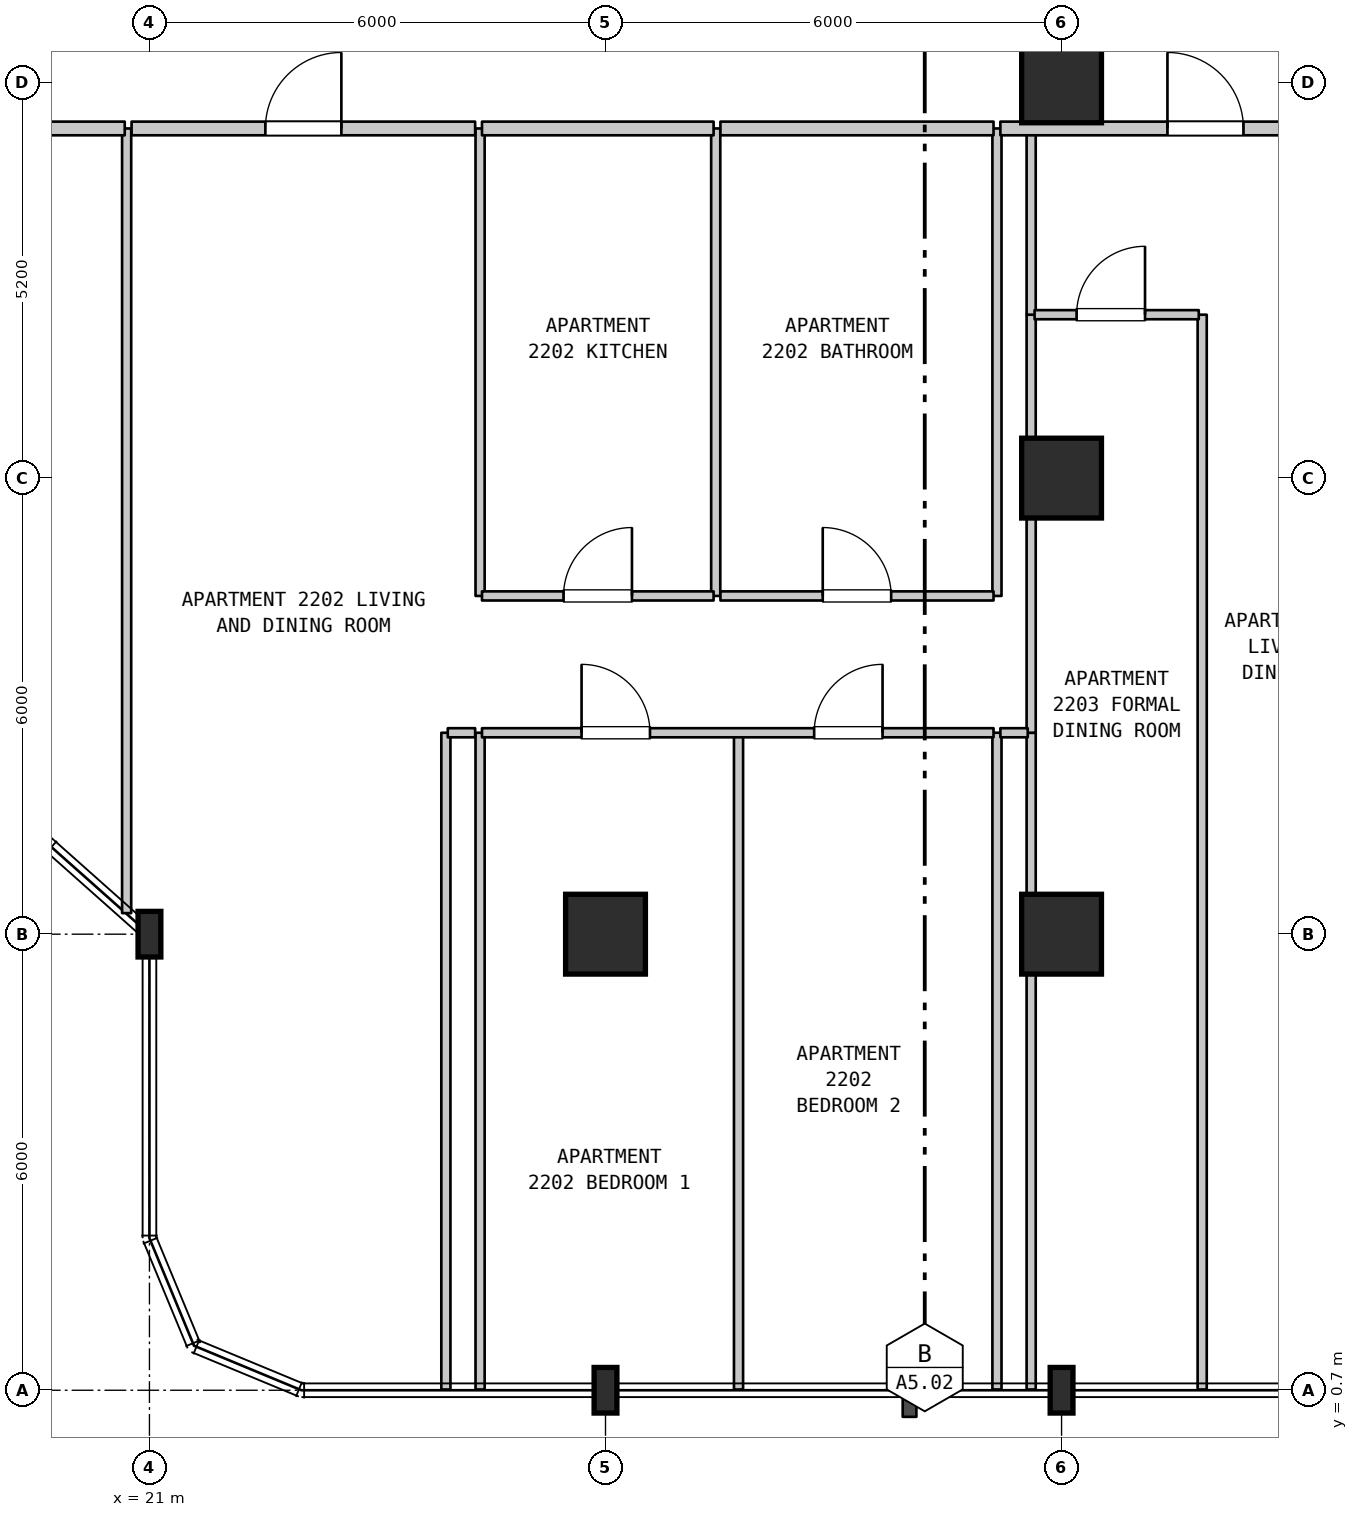
"""IFC4 building model, lengths in metres.
Left out: names, types, materials, properties, quantities, classifications, styles, units other than length and angle.
Written with IfcOpenShell. Run it as: python <this file> out.ifc"""

import sys

from ifc_helpers import new_model, si_unit, direction, frame, frame_2d, origin, origin_2d, place, context, subcontext, project, spatial, rectangle, i_section, extrude, element, fill, save


model = new_model("IFC4")
c1 = context("Model", 3, precision=1e-05, world=origin(), true_north=direction((0.0, 1.0)))
c2 = subcontext(c1, "Body", "Model", "MODEL_VIEW")
j1 = project(units=[si_unit("LENGTHUNIT", "METRE"), si_unit("PLANEANGLEUNIT", "RADIAN")], contexts=[c1])
p1 = place(None, origin())
s1 = spatial("IfcSite", under=j1, at=p1, CompositionType="ELEMENT")
p2 = place(p1, origin())
s2 = spatial("IfcBuilding", under=s1, at=p2, CompositionType="ELEMENT")
p3 = place(p2, frame((0.0, 0.0, 94.6)))
s3 = spatial("IfcBuildingStorey", under=s2, at=p3, CompositionType="ELEMENT", Elevation=94.6)
for number, where, z_axis, x_axis in (
    (1, (21.0, 6.7, 0.0), (0.0, 0.0, 1.0), (1.0, 0.0, 0.0)),
    (2, (27.0, 0.7, 0.0), (0.0, 0.0, 1.0), (1.0, 0.0, 0.0)),
):
    element("IfcColumn", number, at=place(p3, frame(where, z_axis=z_axis, x_axis=x_axis)), inside=s3, PredefinedType="COLUMN", context=c2, shape_type="SweptSolid", body=[
        extrude(i_section(OverallWidth=0.3, OverallDepth=0.6, WebThickness=0.015, FlangeThickness=0.03, FilletRadius=0.027, at=origin_2d()), origin(), (0.0, 0.0, 1.0), 3.7),
    ])
p4 = place(p3, frame((27.0, 6.7, 0.0), z_axis=(0.0, 0.0, 1.0), x_axis=(1.0, 0.0, 0.0)))
e3 = element("IfcColumn", 3, at=p4, inside=s3, PredefinedType="COLUMN", context=c2, shape_type="SweptSolid", body=[
    extrude(rectangle(XDim=1.05, YDim=1.05, at=origin_2d()), origin(), (0.0, 0.0, 1.0), 3.7),
])
p5 = place(p3, frame((33.0, 0.7, 0.0), z_axis=(0.0, 0.0, 1.0), x_axis=(1.0, 0.0, 0.0)))
e4 = element("IfcColumn", 4, at=p5, inside=s3, PredefinedType="COLUMN", context=c2, shape_type="SweptSolid", body=[
    extrude(i_section(OverallWidth=0.3, OverallDepth=0.6, WebThickness=0.015, FlangeThickness=0.03, FilletRadius=0.027, at=origin_2d()), origin(), (0.0, 0.0, 1.0), 3.7),
])
for number, where, z_axis, x_axis in (
    (5, (33.0, 6.7, 0.0), (0.0, 0.0, 1.0), (1.0, 0.0, 0.0)),
    (6, (33.0, 12.7, 0.0), (0.0, 0.0, 1.0), (1.0, 0.0, 0.0)),
    (7, (33.0, 17.9, 0.0), (0.0, 0.0, 1.0), (1.0, 0.0, 0.0)),
):
    element("IfcColumn", number, at=place(p3, frame(where, z_axis=z_axis, x_axis=x_axis)), inside=s3, PredefinedType="COLUMN", context=c2, shape_type="SweptSolid", body=[
        extrude(rectangle(XDim=1.05, YDim=1.05, at=origin_2d()), origin(), (0.0, 0.0, 1.0), 3.7),
    ])
p6 = place(p3, frame((20.7, 6.977, 0.0), z_axis=(0.0, 0.0, 1.0), x_axis=(0.0, 1.0, 0.0)))
e8 = element("IfcWall", 8, at=p6, inside=s3, PredefinedType="PARTITIONING", context=c2, shape_type="SweptSolid", body=[
    extrude(rectangle(XDim=10.323, YDim=0.12, at=frame_2d((5.162, 0.0))), origin(), (0.0, 0.0, 1.0), 3.385),
])
for number, where, z_axis, x_axis in (
    (9, (24.9, 0.71, 0.0), (0.0, 0.0, 1.0), (0.0, 1.0, 0.0)),
    (10, (25.35, 0.71, 0.0), (0.0, 0.0, 1.0), (0.0, 1.0, 0.0)),
):
    element("IfcWall", number, at=place(p3, frame(where, z_axis=z_axis, x_axis=x_axis)), inside=s3, PredefinedType="PARTITIONING", context=c2, shape_type="SweptSolid", body=[
        extrude(rectangle(XDim=8.64, YDim=0.12, at=frame_2d((4.32, 0.0))), origin(), (0.0, 0.0, 1.0), 3.385),
    ])
for number, where, z_axis, x_axis in (
    (11, (25.35, 11.15, 0.0), (0.0, 0.0, 1.0), (0.0, 1.0, 0.0)),
    (12, (28.45, 11.15, 0.0), (0.0, 0.0, 1.0), (0.0, 1.0, 0.0)),
):
    element("IfcWall", number, at=place(p3, frame(where, z_axis=z_axis, x_axis=x_axis)), inside=s3, PredefinedType="PARTITIONING", context=c2, shape_type="SweptSolid", body=[
        extrude(rectangle(XDim=6.15, YDim=0.12, at=frame_2d((3.075, 0.0))), origin(), (0.0, 0.0, 1.0), 3.385),
    ])
for number, where, z_axis, x_axis in (
    (13, (28.75, 0.71, 0.0), (0.0, 0.0, 1.0), (0.0, 1.0, 0.0)),
    (14, (32.15, 0.71, 0.0), (0.0, 0.0, 1.0), (0.0, 1.0, 0.0)),
):
    element("IfcWall", number, at=place(p3, frame(where, z_axis=z_axis, x_axis=x_axis)), inside=s3, PredefinedType="PARTITIONING", context=c2, shape_type="SweptSolid", body=[
        extrude(rectangle(XDim=8.64, YDim=0.12, at=frame_2d((4.32, 0.0))), origin(), (0.0, 0.0, 1.0), 3.385),
    ])
p7 = place(p3, frame((32.15, 11.15, 0.0), z_axis=(0.0, 0.0, 1.0), x_axis=(0.0, 1.0, 0.0)))
e15 = element("IfcWall", 15, at=p7, inside=s3, PredefinedType="PARTITIONING", context=c2, shape_type="SweptSolid", body=[
    extrude(rectangle(XDim=6.15, YDim=0.12, at=frame_2d((3.075, 0.0))), origin(), (0.0, 0.0, 1.0), 3.385),
])
p8 = place(p3, frame((32.6, 0.71, 0.0), z_axis=(0.0, 0.0, 1.0), x_axis=(0.0, 1.0, 0.0)))
e16 = element("IfcWall", 16, at=p8, inside=s3, PredefinedType="PARTITIONING", context=c2, shape_type="SweptSolid", body=[
    extrude(rectangle(XDim=8.64, YDim=0.12, at=frame_2d((4.32, 0.0))), origin(), (0.0, 0.0, 1.0), 3.385),
])
p9 = place(p3, frame((32.6, 9.35, 0.0), z_axis=(0.0, 0.0, 1.0), x_axis=(0.0, 1.0, 0.0)))
e17 = element("IfcWall", 17, at=p9, inside=s3, PredefinedType="PARTITIONING", context=c2, shape_type="SweptSolid", body=[
    extrude(rectangle(XDim=5.5, YDim=0.12, at=frame_2d((2.75, 0.0))), origin(), (0.0, 0.0, 1.0), 3.385),
])
p10 = place(p3, frame((32.6, 14.85, 0.0), z_axis=(0.0, 0.0, 1.0), x_axis=(0.0, 1.0, 0.0)))
e18 = element("IfcWall", 18, at=p10, inside=s3, PredefinedType="PARTITIONING", context=c2, shape_type="SweptSolid", body=[
    extrude(rectangle(XDim=2.45, YDim=0.12, at=frame_2d((1.225, 0.0))), origin(), (0.0, 0.0, 1.0), 3.385),
])
p11 = place(p3, frame((34.85, 0.71, 0.0), z_axis=(0.0, 0.0, 1.0), x_axis=(0.0, 1.0, 0.0)))
e19 = element("IfcWall", 19, at=p11, inside=s3, PredefinedType="PARTITIONING", context=c2, shape_type="SweptSolid", body=[
    extrude(rectangle(XDim=14.14, YDim=0.12, at=frame_2d((7.07, 0.0))), origin(), (0.0, 0.0, 1.0), 3.385),
])
p12 = place(p3, frame((24.925, 9.35, 0.0), z_axis=(0.0, 0.0, 1.0), x_axis=(1.0, 0.0, 0.0)))
e20 = element("IfcWall", 20, at=p12, inside=s3, PredefinedType="PARTITIONING", context=c2, shape_type="SweptSolid", body=[
    extrude(rectangle(XDim=0.36, YDim=0.12, at=frame_2d((0.18, 0.0))), origin(), (0.0, 0.0, 1.0), 3.385),
])
p13 = place(p3, frame((25.375, 9.35, 0.0), z_axis=(0.0, 0.0, 1.0), x_axis=(1.0, 0.0, 0.0)))
e21 = element("IfcWall", 21, at=p13, inside=s3, PredefinedType="PARTITIONING", context=c2, shape_type="SweptSolid", body=[
    extrude(rectangle(XDim=6.73, YDim=0.12, at=frame_2d((3.365, 0.0))), origin(), (0.0, 0.0, 1.0), 3.385),
])
p14 = place(p13, frame((1.31, 0.0, 0.0)))
e22 = element("IfcOpeningElement", 22, at=p14, cuts=e21, PredefinedType="OPENING", context=c2, shape_type="SweptSolid", body=[
    extrude(rectangle(XDim=0.9, YDim=2.15, at=frame_2d((0.45, 1.075))), frame((0.0, 0.07, 0.0), z_axis=(0.0, -1.0, 0.0), x_axis=(1.0, 0.0, 0.0)), (0.0, 0.0, 1.0), 0.14),
])
p15 = place(p13, frame((4.37, 0.0, 0.0)))
e23 = element("IfcOpeningElement", 23, at=p15, cuts=e21, PredefinedType="OPENING", context=c2, shape_type="SweptSolid", body=[
    extrude(rectangle(XDim=0.9, YDim=2.15, at=frame_2d((0.45, 1.075))), frame((0.0, 0.07, 0.0), z_axis=(0.0, -1.0, 0.0), x_axis=(1.0, 0.0, 0.0)), (0.0, 0.0, 1.0), 0.14),
])
p16 = place(p3, frame((32.195, 9.35, 0.0), z_axis=(0.0, 0.0, 1.0), x_axis=(1.0, 0.0, 0.0)))
e24 = element("IfcWall", 24, at=p16, inside=s3, PredefinedType="PARTITIONING", context=c2, shape_type="SweptSolid", body=[
    extrude(rectangle(XDim=0.36, YDim=0.12, at=frame_2d((0.18, 0.0))), origin(), (0.0, 0.0, 1.0), 3.385),
])
p17 = place(p3, frame((25.375, 11.15, 0.0), z_axis=(0.0, 0.0, 1.0), x_axis=(1.0, 0.0, 0.0)))
e25 = element("IfcWall", 25, at=p17, inside=s3, PredefinedType="PARTITIONING", context=c2, shape_type="SweptSolid", body=[
    extrude(rectangle(XDim=3.047, YDim=0.12, at=frame_2d((1.523, 0.0))), origin(), (0.0, 0.0, 1.0), 3.385),
])
p18 = place(p17, frame((1.073, 0.0, 0.0)))
e26 = element("IfcOpeningElement", 26, at=p18, cuts=e25, PredefinedType="OPENING", context=c2, shape_type="SweptSolid", body=[
    extrude(rectangle(XDim=0.9, YDim=2.15, at=frame_2d((0.45, 1.075))), frame((0.0, 0.07, 0.0), z_axis=(0.0, -1.0, 0.0), x_axis=(1.0, 0.0, 0.0)), (0.0, 0.0, 1.0), 0.14),
])
p19 = place(p3, frame((28.512, 11.15, 0.0), z_axis=(0.0, 0.0, 1.0), x_axis=(1.0, 0.0, 0.0)))
e27 = element("IfcWall", 27, at=p19, inside=s3, PredefinedType="PARTITIONING", context=c2, shape_type="SweptSolid", body=[
    extrude(rectangle(XDim=3.593, YDim=0.12, at=frame_2d((1.796, 0.0))), origin(), (0.0, 0.0, 1.0), 3.385),
])
p20 = place(p19, frame((1.346, 0.0, 0.0)))
e28 = element("IfcOpeningElement", 28, at=p20, cuts=e27, PredefinedType="OPENING", context=c2, shape_type="SweptSolid", body=[
    extrude(rectangle(XDim=0.9, YDim=2.1, at=frame_2d((0.45, 1.05))), frame((0.0, 0.07, 0.0), z_axis=(0.0, -1.0, 0.0), x_axis=(1.0, 0.0, 0.0)), (0.0, 0.0, 1.0), 0.14),
])
p21 = place(p3, frame((32.645, 14.85, 0.0), z_axis=(0.0, 0.0, 1.0), x_axis=(1.0, 0.0, 0.0)))
e29 = element("IfcWall", 29, at=p21, inside=s3, PredefinedType="PARTITIONING", context=c2, shape_type="SweptSolid", body=[
    extrude(rectangle(XDim=2.16, YDim=0.12, at=frame_2d((1.08, 0.0))), origin(), (0.0, 0.0, 1.0), 3.385),
])
p22 = place(p21, frame((0.553, 0.0, 0.0)))
e30 = element("IfcOpeningElement", 30, at=p22, cuts=e29, PredefinedType="OPENING", context=c2, shape_type="SweptSolid", body=[
    extrude(rectangle(XDim=0.9, YDim=2.15, at=frame_2d((0.45, 1.075))), frame((0.0, 0.07, 0.0), z_axis=(0.0, -1.0, 0.0), x_axis=(1.0, 0.0, 0.0)), (0.0, 0.0, 1.0), 0.14),
])
p23 = place(p3, frame((18.815, 17.3, 0.0), z_axis=(0.0, 0.0, 1.0), x_axis=(1.0, 0.0, 0.0)))
e31 = element("IfcWall", 31, at=p23, inside=s3, PredefinedType="STANDARD", context=c2, shape_type="SweptSolid", body=[
    extrude(rectangle(XDim=1.86, YDim=0.18, at=frame_2d((0.93, 0.0))), origin(), (0.0, 0.0, 1.0), 3.385),
])
p24 = place(p3, frame((20.765, 17.3, 0.0), z_axis=(0.0, 0.0, 1.0), x_axis=(1.0, 0.0, 0.0)))
e32 = element("IfcWall", 32, at=p24, inside=s3, PredefinedType="STANDARD", context=c2, shape_type="SweptSolid", body=[
    extrude(rectangle(XDim=4.52, YDim=0.18, at=frame_2d((2.26, 0.0))), origin(), (0.0, 0.0, 1.0), 3.385),
])
p25 = place(p24, frame((1.76, 0.0, 0.0)))
e33 = element("IfcOpeningElement", 33, at=p25, cuts=e32, PredefinedType="OPENING", context=c2, shape_type="SweptSolid", body=[
    extrude(rectangle(XDim=1.0, YDim=2.15, at=frame_2d((0.5, 1.075))), frame((0.0, 0.1, 0.0), z_axis=(0.0, -1.0, 0.0), x_axis=(1.0, 0.0, 0.0)), (0.0, 0.0, 1.0), 0.2),
])
p26 = place(p3, frame((25.375, 17.3, 0.0), z_axis=(0.0, 0.0, 1.0), x_axis=(1.0, 0.0, 0.0)))
e34 = element("IfcWall", 34, at=p26, inside=s3, PredefinedType="STANDARD", context=c2, shape_type="SweptSolid", body=[
    extrude(rectangle(XDim=3.047, YDim=0.18, at=frame_2d((1.523, 0.0))), origin(), (0.0, 0.0, 1.0), 3.385),
])
p27 = place(p3, frame((28.512, 17.3, 0.0), z_axis=(0.0, 0.0, 1.0), x_axis=(1.0, 0.0, 0.0)))
e35 = element("IfcWall", 35, at=p27, inside=s3, PredefinedType="STANDARD", context=c2, shape_type="SweptSolid", body=[
    extrude(rectangle(XDim=3.593, YDim=0.18, at=frame_2d((1.796, 0.0))), origin(), (0.0, 0.0, 1.0), 3.385),
])
p28 = place(p3, frame((32.195, 17.3, 0.0), z_axis=(0.0, 0.0, 1.0), x_axis=(1.0, 0.0, 0.0)))
e36 = element("IfcWall", 36, at=p28, inside=s3, PredefinedType="STANDARD", context=c2, shape_type="SweptSolid", body=[
    extrude(rectangle(XDim=5.14, YDim=0.18, at=frame_2d((2.57, 0.0))), origin(), (0.0, 0.0, 1.0), 3.385),
])
p29 = place(p28, frame((2.198, 0.0, 0.0)))
e37 = element("IfcOpeningElement", 37, at=p29, cuts=e36, PredefinedType="OPENING", context=c2, shape_type="SweptSolid", body=[
    extrude(rectangle(XDim=1.0, YDim=2.15, at=frame_2d((0.5, 1.075))), frame((0.0, 0.1, 0.0), z_axis=(0.0, -1.0, 0.0), x_axis=(1.0, 0.0, 0.0)), (0.0, 0.0, 1.0), 0.2),
])
p30 = place(p14, origin())
e38 = element("IfcDoor", 38, at=p30, inside=s3, OperationType="SINGLE_SWING_LEFT", PredefinedType="DOOR", context=c2, shape_type="SweptSolid", body=[
    extrude(rectangle(XDim=0.9, YDim=2.15, at=frame_2d((0.45, 1.075))), frame((0.0, 0.025, 0.0), z_axis=(0.0, -1.0, 0.0), x_axis=(1.0, 0.0, 0.0)), (0.0, 0.0, 1.0), 0.05),
])
fill(e22, e38)
p31 = place(p15, origin())
e39 = element("IfcDoor", 39, at=p31, inside=s3, OperationType="SINGLE_SWING_RIGHT", PredefinedType="DOOR", context=c2, shape_type="SweptSolid", body=[
    extrude(rectangle(XDim=0.9, YDim=2.15, at=frame_2d((0.45, 1.075))), frame((0.0, 0.025, 0.0), z_axis=(0.0, -1.0, 0.0), x_axis=(1.0, 0.0, 0.0)), (0.0, 0.0, 1.0), 0.05),
])
fill(e23, e39)
p32 = place(p18, origin())
e40 = element("IfcDoor", 40, at=p32, inside=s3, OperationType="SINGLE_SWING_RIGHT", PredefinedType="DOOR", context=c2, shape_type="SweptSolid", body=[
    extrude(rectangle(XDim=0.9, YDim=2.15, at=frame_2d((0.45, 1.075))), frame((0.0, 0.025, 0.0), z_axis=(0.0, -1.0, 0.0), x_axis=(1.0, 0.0, 0.0)), (0.0, 0.0, 1.0), 0.05),
])
fill(e26, e40)
p33 = place(p20, origin())
e41 = element("IfcDoor", 41, at=p33, inside=s3, OperationType="SINGLE_SWING_LEFT", PredefinedType="DOOR", context=c2, shape_type="SweptSolid", body=[
    extrude(rectangle(XDim=0.9, YDim=2.1, at=frame_2d((0.45, 1.05))), frame((0.0, 0.025, 0.0), z_axis=(0.0, -1.0, 0.0), x_axis=(1.0, 0.0, 0.0)), (0.0, 0.0, 1.0), 0.05),
])
fill(e28, e41)
p34 = place(p22, origin())
e42 = element("IfcDoor", 42, at=p34, inside=s3, OperationType="SINGLE_SWING_RIGHT", PredefinedType="DOOR", context=c2, shape_type="SweptSolid", body=[
    extrude(rectangle(XDim=0.9, YDim=2.15, at=frame_2d((0.45, 1.075))), frame((0.0, 0.025, 0.0), z_axis=(0.0, -1.0, 0.0), x_axis=(1.0, 0.0, 0.0)), (0.0, 0.0, 1.0), 0.05),
])
fill(e30, e42)
p35 = place(p25, origin())
e43 = element("IfcDoor", 43, at=p35, inside=s3, OperationType="SINGLE_SWING_RIGHT", PredefinedType="DOOR", context=c2, shape_type="SweptSolid", body=[
    extrude(rectangle(XDim=1.0, YDim=2.15, at=frame_2d((0.5, 1.075))), frame((0.0, 0.025, 0.0), z_axis=(0.0, -1.0, 0.0), x_axis=(1.0, 0.0, 0.0)), (0.0, 0.0, 1.0), 0.05),
])
fill(e33, e43)
p36 = place(p29, origin())
e44 = element("IfcDoor", 44, at=p36, inside=s3, OperationType="SINGLE_SWING_LEFT", PredefinedType="DOOR", context=c2, shape_type="SweptSolid", body=[
    extrude(rectangle(XDim=1.0, YDim=2.15, at=frame_2d((0.5, 1.075))), frame((0.0, 0.025, 0.0), z_axis=(0.0, -1.0, 0.0), x_axis=(1.0, 0.0, 0.0)), (0.0, 0.0, 1.0), 0.05),
])
fill(e37, e44)
save(model, sys.argv[1])
